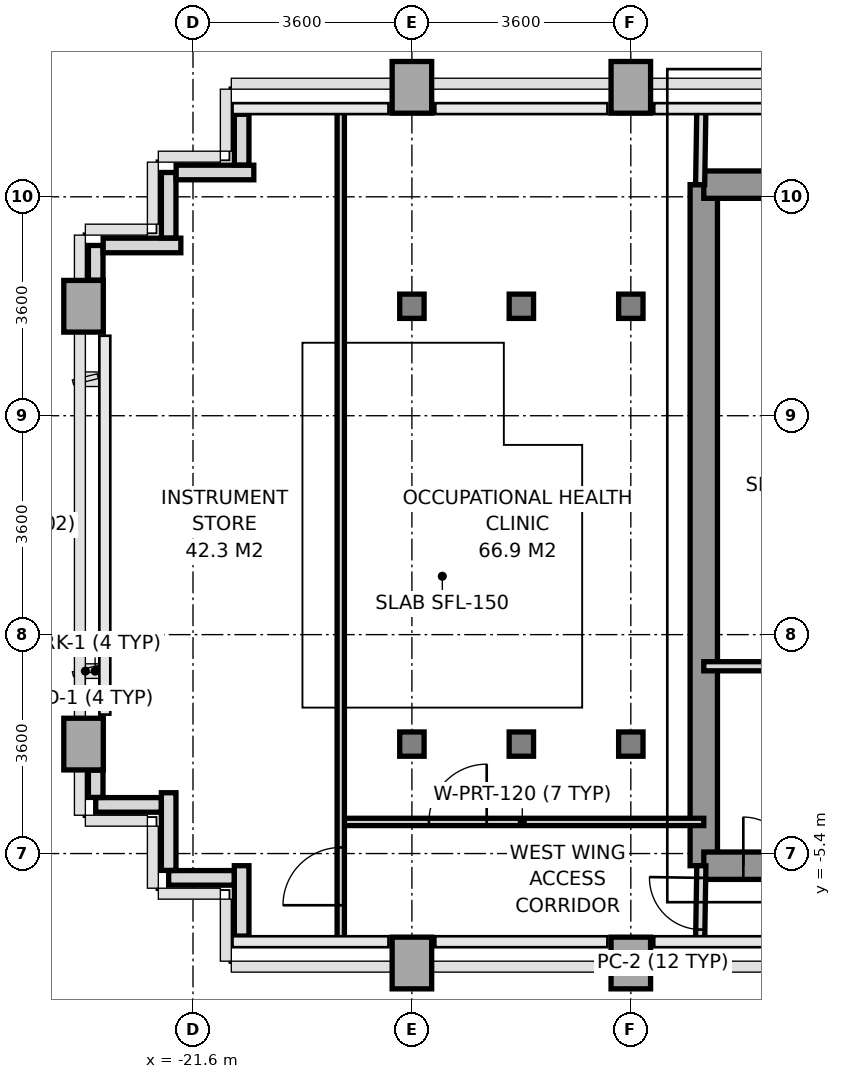
"""IFC4 building model, lengths in metres.
Left out: names, types, materials, properties, quantities, classifications, styles, units other than length and angle.
Written with IfcOpenShell. Run it as: python <this file> out.ifc"""

import sys

from ifc_helpers import new_model, si_unit, direction, frame, frame_2d, origin, origin_2d, place, context, subcontext, project, spatial, rectangle, i_section, extrude, source, transform, mapped, element, fill, save


model = new_model("IFC4")
c1 = context("Model", 3, precision=1e-05, world=origin(), true_north=direction((0.0, 1.0)))
c2 = subcontext(c1, "Body", "Model", "MODEL_VIEW")
j1 = project(units=[si_unit("LENGTHUNIT", "METRE"), si_unit("PLANEANGLEUNIT", "RADIAN")], contexts=[c1])
p1 = place(None, origin())
s1 = spatial("IfcSite", under=j1, at=p1, CompositionType="ELEMENT")
p2 = place(p1, origin())
s2 = spatial("IfcBuilding", under=s1, at=p2, CompositionType="ELEMENT")
p3 = place(p2, frame((0.0, 0.0, 141.4)))
s3 = spatial("IfcBuildingStorey", under=s2, at=p3, CompositionType="ELEMENT", Elevation=141.4)
m1 = source(origin(), c2, "Body", "SweptSolid", [
    extrude(rectangle(XDim=0.65, YDim=0.85, at=origin_2d()), origin(), (0.0, 0.0, 1.0), 3.2),
])
for number, where, z_axis, x_axis in (
    (1, (-23.4, -3.6, 0.0), (0.0, 0.0, 1.0), (1.0, 0.0, 0.0)),
    (2, (-23.4, 3.6, 0.0), (0.0, 0.0, 1.0), (1.0, 0.0, 0.0)),
    (3, (-18.0, -7.2, 0.0), (0.0, 0.0, 1.0), (1.0, 0.0, 0.0)),
):
    element("IfcColumn", number, at=place(p3, frame(where, z_axis=z_axis, x_axis=x_axis)), inside=s3, PredefinedType="COLUMN", context=c2, shape_type="MappedRepresentation", body=[
        mapped(m1, transform((0.0, 0.0, 0.0), x_axis=(1.0, 0.0, 0.0), y_axis=(0.0, 1.0, 0.0), z_axis=(0.0, 0.0, 1.0), scale=1.0)),
    ])
m2 = source(origin(), c2, "Body", "SweptSolid", [
    extrude(i_section(OverallWidth=0.401, OverallDepth=0.399, WebThickness=0.02, FlangeThickness=0.032, at=origin_2d()), origin(), (0.0, 0.0, 1.0), 3.2),
])
for number, where, z_axis, x_axis in (
    (4, (-18.0, -3.6, 0.0), (0.0, 0.0, 1.0), (1.0, 0.0, 0.0)),
    (5, (-18.0, 3.6, 0.0), (0.0, 0.0, 1.0), (1.0, 0.0, 0.0)),
):
    element("IfcColumn", number, at=place(p3, frame(where, z_axis=z_axis, x_axis=x_axis)), inside=s3, PredefinedType="COLUMN", context=c2, shape_type="MappedRepresentation", body=[
        mapped(m2, transform((0.0, 0.0, 0.0), x_axis=(1.0, 0.0, 0.0), y_axis=(0.0, 1.0, 0.0), z_axis=(0.0, 0.0, 1.0), scale=1.0)),
    ])
p4 = place(p3, frame((-18.0, 7.2, 0.0), z_axis=(0.0, 0.0, 1.0), x_axis=(1.0, 0.0, 0.0)))
e6 = element("IfcColumn", 6, at=p4, inside=s3, PredefinedType="COLUMN", context=c2, shape_type="MappedRepresentation", body=[
    mapped(m1, transform((0.0, 0.0, 0.0), x_axis=(1.0, 0.0, 0.0), y_axis=(0.0, 1.0, 0.0), z_axis=(0.0, 0.0, 1.0), scale=1.0)),
])
for number, where, z_axis, x_axis in (
    (7, (-16.2, -3.6, 0.0), (0.0, 0.0, 1.0), (1.0, 0.0, 0.0)),
    (8, (-16.2, 3.6, 0.0), (0.0, 0.0, 1.0), (1.0, 0.0, 0.0)),
):
    element("IfcColumn", number, at=place(p3, frame(where, z_axis=z_axis, x_axis=x_axis)), inside=s3, PredefinedType="COLUMN", context=c2, shape_type="MappedRepresentation", body=[
        mapped(m2, transform((0.0, 0.0, 0.0), x_axis=(1.0, 0.0, 0.0), y_axis=(0.0, 1.0, 0.0), z_axis=(0.0, 0.0, 1.0), scale=1.0)),
    ])
p5 = place(p3, frame((-14.4, -7.2, 0.0), z_axis=(0.0, 0.0, 1.0), x_axis=(1.0, 0.0, 0.0)))
e9 = element("IfcColumn", 9, at=p5, inside=s3, PredefinedType="COLUMN", context=c2, shape_type="MappedRepresentation", body=[
    mapped(m1, transform((0.0, 0.0, 0.0), x_axis=(1.0, 0.0, 0.0), y_axis=(0.0, 1.0, 0.0), z_axis=(0.0, 0.0, 1.0), scale=1.0)),
])
for number, where, z_axis, x_axis in (
    (10, (-14.4, -3.6, 0.0), (0.0, 0.0, 1.0), (1.0, 0.0, 0.0)),
    (11, (-14.4, 3.6, 0.0), (0.0, 0.0, 1.0), (1.0, 0.0, 0.0)),
):
    element("IfcColumn", number, at=place(p3, frame(where, z_axis=z_axis, x_axis=x_axis)), inside=s3, PredefinedType="COLUMN", context=c2, shape_type="MappedRepresentation", body=[
        mapped(m2, transform((0.0, 0.0, 0.0), x_axis=(1.0, 0.0, 0.0), y_axis=(0.0, 1.0, 0.0), z_axis=(0.0, 0.0, 1.0), scale=1.0)),
    ])
p6 = place(p3, frame((-14.4, 7.2, 0.0), z_axis=(0.0, 0.0, 1.0), x_axis=(1.0, 0.0, 0.0)))
e12 = element("IfcColumn", 12, at=p6, inside=s3, PredefinedType="COLUMN", context=c2, shape_type="MappedRepresentation", body=[
    mapped(m1, transform((0.0, 0.0, 0.0), x_axis=(1.0, 0.0, 0.0), y_axis=(0.0, 1.0, 0.0), z_axis=(0.0, 0.0, 1.0), scale=1.0)),
])
p7 = place(p3, frame((-20.8, -6.757, 0.0), z_axis=(0.0, 0.0, 1.0), x_axis=(0.0, 1.0, 0.0)))
e13 = element("IfcWall", 13, at=p7, inside=s3, PredefinedType="PARAPET", context=c2, shape_type="SweptSolid", body=[
    extrude(rectangle(XDim=1.157, YDim=0.24, at=frame_2d((0.579, 0.0))), origin(), (0.0, 0.0, 1.0), 1.15),
])
p8 = place(p3, frame((-20.923, -5.8, 0.0), z_axis=(0.0, 0.0, 1.0), x_axis=(-1.0, 0.0, 0.0)))
e14 = element("IfcWall", 14, at=p8, inside=s3, PredefinedType="PARAPET", context=c2, shape_type="SweptSolid", body=[
    extrude(rectangle(XDim=1.077, YDim=0.24, at=frame_2d((0.539, 0.0))), origin(), (0.0, 0.0, 1.0), 1.15),
])
p9 = place(p3, frame((-22.0, -5.677, 0.0), z_axis=(0.0, 0.0, 1.0), x_axis=(0.0, 1.0, 0.0)))
e15 = element("IfcWall", 15, at=p9, inside=s3, PredefinedType="PARAPET", context=c2, shape_type="SweptSolid", body=[
    extrude(rectangle(XDim=1.277, YDim=0.24, at=frame_2d((0.639, 0.0))), origin(), (0.0, 0.0, 1.0), 1.15),
])
p10 = place(p3, frame((-22.123, -4.6, 0.0), z_axis=(0.0, 0.0, 1.0), x_axis=(-1.0, 0.0, 0.0)))
e16 = element("IfcWall", 16, at=p10, inside=s3, PredefinedType="PARAPET", context=c2, shape_type="SweptSolid", body=[
    extrude(rectangle(XDim=1.077, YDim=0.24, at=frame_2d((0.539, 0.0))), origin(), (0.0, 0.0, 1.0), 1.15),
])
p11 = place(p3, frame((-23.2, -4.477, 0.0), z_axis=(0.0, 0.0, 1.0), x_axis=(0.0, 1.0, 0.0)))
e17 = element("IfcWall", 17, at=p11, inside=s3, PredefinedType="PARAPET", context=c2, shape_type="SweptSolid", body=[
    extrude(rectangle(XDim=0.449, YDim=0.24, at=frame_2d((0.225, 0.0))), origin(), (0.0, 0.0, 1.0), 1.15),
])
p12 = place(p3, frame((-23.2, 4.028, 0.0), z_axis=(0.0, 0.0, 1.0), x_axis=(0.0, 1.0, 0.0)))
e18 = element("IfcWall", 18, at=p12, inside=s3, PredefinedType="PARAPET", context=c2, shape_type="SweptSolid", body=[
    extrude(rectangle(XDim=0.572, YDim=0.24, at=frame_2d((0.286, 0.0))), origin(), (0.0, 0.0, 1.0), 1.15),
])
p13 = place(p3, frame((-23.077, 4.6, 0.0), z_axis=(0.0, 0.0, 1.0), x_axis=(1.0, 0.0, 0.0)))
e19 = element("IfcWall", 19, at=p13, inside=s3, PredefinedType="PARAPET", context=c2, shape_type="SweptSolid", body=[
    extrude(rectangle(XDim=1.277, YDim=0.24, at=frame_2d((0.638, 0.0))), origin(), (0.0, 0.0, 1.0), 1.15),
])
p14 = place(p3, frame((-22.0, 4.723, 0.0), z_axis=(0.0, 0.0, 1.0), x_axis=(0.0, 1.0, 0.0)))
e20 = element("IfcWall", 20, at=p14, inside=s3, PredefinedType="PARAPET", context=c2, shape_type="SweptSolid", body=[
    extrude(rectangle(XDim=1.077, YDim=0.24, at=frame_2d((0.539, 0.0))), origin(), (0.0, 0.0, 1.0), 1.15),
])
p15 = place(p3, frame((-21.877, 5.8, 0.0), z_axis=(0.0, 0.0, 1.0), x_axis=(1.0, 0.0, 0.0)))
e21 = element("IfcWall", 21, at=p15, inside=s3, PredefinedType="PARAPET", context=c2, shape_type="SweptSolid", body=[
    extrude(rectangle(XDim=1.277, YDim=0.24, at=frame_2d((0.638, 0.0))), origin(), (0.0, 0.0, 1.0), 1.15),
])
p16 = place(p3, frame((-20.8, 5.923, 0.0), z_axis=(0.0, 0.0, 1.0), x_axis=(0.0, 1.0, 0.0)))
e22 = element("IfcWall", 22, at=p16, inside=s3, PredefinedType="PARAPET", context=c2, shape_type="SweptSolid", body=[
    extrude(rectangle(XDim=0.834, YDim=0.24, at=frame_2d((0.417, 0.0))), origin(), (0.0, 0.0, 1.0), 1.15),
])
p17 = place(p3, frame((-13.2, -5.6, 0.0), z_axis=(0.0, 0.0, 1.0), x_axis=(0.0, 1.0, 0.0)))
e23 = element("IfcWall", 23, at=p17, inside=s3, PredefinedType="SHEAR", context=c2, shape_type="SweptSolid", body=[
    extrude(rectangle(XDim=11.2, YDim=0.45, at=frame_2d((5.6, 0.0))), origin(), (0.0, 0.0, 1.0), 3.2),
])
p18 = place(p3, frame((-13.2, 5.6, 0.0), z_axis=(0.0, 0.0, 1.0), x_axis=(1.0, 0.0, 0.0)))
e24 = element("IfcWall", 24, at=p18, inside=s3, PredefinedType="SHEAR", context=c2, shape_type="SweptSolid", body=[
    extrude(rectangle(XDim=1.819, YDim=0.45, at=frame_2d((0.909, 0.0))), origin(), (0.0, 0.0, 1.0), 3.2),
])
p19 = place(p3, frame((-13.2, -5.6, 0.0), z_axis=(0.0, 0.0, 1.0), x_axis=(1.0, 0.0, 0.0)))
e25 = element("IfcWall", 25, at=p19, inside=s3, PredefinedType="SHEAR", context=c2, shape_type="SweptSolid", body=[
    extrude(rectangle(XDim=7.8, YDim=0.45, at=frame_2d((3.9, 0.0))), origin(), (0.0, 0.0, 1.0), 3.2),
])
p20 = place(p19, frame((3.6, 0.0, 0.0)))
e26 = element("IfcOpeningElement", 26, at=p20, cuts=e25, PredefinedType="OPENING", context=c2, shape_type="SweptSolid", body=[
    extrude(rectangle(XDim=1.2, YDim=2.2, at=frame_2d((0.6, 1.1))), frame((0.0, 0.235, 0.0), z_axis=(0.0, -1.0, 0.0), x_axis=(1.0, 0.0, 0.0)), (0.0, 0.0, 1.0), 0.47),
])
p21 = place(p19, frame((0.65, 0.0, 0.0)))
e27 = element("IfcOpeningElement", 27, at=p21, cuts=e25, PredefinedType="OPENING", context=c2, shape_type="SweptSolid", body=[
    extrude(rectangle(XDim=0.8, YDim=2.1, at=frame_2d((0.4, 1.05))), frame((0.0, 0.235, 0.0), z_axis=(0.0, -1.0, 0.0), x_axis=(1.0, 0.0, 0.0)), (0.0, 0.0, 1.0), 0.47),
])
p22 = place(p3, frame((-13.2, -2.32, 0.0), z_axis=(0.0, 0.0, 1.0), x_axis=(1.0, 0.0, 0.0)))
e28 = element("IfcWall", 28, at=p22, inside=s3, PredefinedType="PARTITIONING", context=c2, shape_type="SweptSolid", body=[
    extrude(rectangle(XDim=2.18, YDim=0.15, at=frame_2d((1.09, 0.0))), origin(), (0.0, 0.0, 1.0), 3.2),
])
p23 = place(p3, frame((-13.26, 5.6, 0.0), z_axis=(0.0, 0.0, 1.0), x_axis=(0.016013571389, 0.999871774545, 0.0)))
e29 = element("IfcWall", 29, at=p23, inside=s3, PredefinedType="PARTITIONING", context=c2, shape_type="SweptSolid", body=[
    extrude(rectangle(XDim=1.25, YDim=0.15, at=frame_2d((0.625, 0.0))), origin(), (0.0, 0.0, 1.0), 3.2),
])
p24 = place(p3, frame((-13.26, -6.85, 0.0), z_axis=(0.0, 0.0, 1.0), x_axis=(0.016013571389, 0.999871774545, 0.0)))
e30 = element("IfcWall", 30, at=p24, inside=s3, PredefinedType="PARTITIONING", context=c2, shape_type="SweptSolid", body=[
    extrude(rectangle(XDim=1.25, YDim=0.15, at=frame_2d((0.625, 0.0))), origin(), (0.0, 0.0, 1.0), 3.2),
])
p25 = place(p24, frame((0.2, 0.0, 0.0)))
e31 = element("IfcOpeningElement", 31, at=p25, cuts=e30, PredefinedType="OPENING", context=c2, shape_type="SweptSolid", body=[
    extrude(rectangle(XDim=0.85, YDim=2.1, at=frame_2d((0.425, 1.05))), frame((0.0, 0.085, 0.0), z_axis=(0.0, -1.0, 0.0), x_axis=(1.0, 0.0, 0.0)), (0.0, 0.0, 1.0), 0.17),
])
p26 = place(p3, frame((-19.17, -4.88, 0.0), z_axis=(0.0, 0.0, 1.0), x_axis=(1.0, 0.0, 0.0)))
e32 = element("IfcWall", 32, at=p26, inside=s3, PredefinedType="PARTITIONING", context=c2, shape_type="SweptSolid", body=[
    extrude(rectangle(XDim=5.97, YDim=0.12, at=frame_2d((2.985, 0.0))), origin(), (0.0, 0.0, 1.0), 2.75),
])
p27 = place(p26, frame((1.45, 0.0, 0.0)))
e33 = element("IfcOpeningElement", 33, at=p27, cuts=e32, PredefinedType="OPENING", context=c2, shape_type="SweptSolid", body=[
    extrude(rectangle(XDim=0.95, YDim=2.15, at=frame_2d((0.475, 1.075))), frame((0.0, 0.07, 0.0), z_axis=(0.0, -1.0, 0.0), x_axis=(1.0, 0.0, 0.0)), (0.0, 0.0, 1.0), 0.14),
])
p28 = place(p3, frame((-19.17, -6.85, 0.0), z_axis=(0.0, 0.0, 1.0), x_axis=(0.0, 1.0, 0.0)))
e34 = element("IfcWall", 34, at=p28, inside=s3, PredefinedType="PARTITIONING", context=c2, shape_type="SweptSolid", body=[
    extrude(rectangle(XDim=13.7, YDim=0.12, at=frame_2d((6.85, 0.0))), origin(), (0.0, 0.0, 1.0), 2.7),
])
p29 = place(p28, frame((0.6, 0.0, 0.0)))
e35 = element("IfcOpeningElement", 35, at=p29, cuts=e34, PredefinedType="OPENING", context=c2, shape_type="SweptSolid", body=[
    extrude(rectangle(XDim=0.95, YDim=2.15, at=frame_2d((0.475, 1.075))), frame((0.0, 0.07, 0.0), z_axis=(0.0, -1.0, 0.0), x_axis=(1.0, 0.0, 0.0)), (0.0, 0.0, 1.0), 0.14),
])
m3 = source(origin(), c2, "Body", "SweptSolid", [
    extrude(rectangle(XDim=0.8, YDim=2.1, at=frame_2d((0.4, 1.05))), frame((0.0, 0.025, 0.0), z_axis=(0.0, -1.0, 0.0), x_axis=(1.0, 0.0, 0.0)), (0.0, 0.0, 1.0), 0.05),
])
p30 = place(p21, origin())
e36 = element("IfcDoor", 36, at=p30, inside=s3, OperationType="SINGLE_SWING_LEFT", PredefinedType="DOOR", context=c2, shape_type="MappedRepresentation", body=[
    mapped(m3, transform((0.0, 0.0, 0.0), x_axis=(1.0, 0.0, 0.0), y_axis=(0.0, 1.0, 0.0), z_axis=(0.0, 0.0, 1.0), scale=1.0)),
])
fill(e27, e36)
m4 = source(origin(), c2, "Body", "SweptSolid", [
    extrude(rectangle(XDim=0.95, YDim=2.15, at=frame_2d((0.475, 1.075))), frame((0.0, 0.025, 0.0), z_axis=(0.0, -1.0, 0.0), x_axis=(1.0, 0.0, 0.0)), (0.0, 0.0, 1.0), 0.05),
])
p31 = place(p27, origin())
e37 = element("IfcDoor", 37, at=p31, inside=s3, OperationType="SINGLE_SWING_RIGHT", PredefinedType="DOOR", context=c2, shape_type="MappedRepresentation", body=[
    mapped(m4, transform((0.0, 0.0, 0.0), x_axis=(1.0, 0.0, 0.0), y_axis=(0.0, 1.0, 0.0), z_axis=(0.0, 0.0, 1.0), scale=1.0)),
])
fill(e33, e37)
p32 = place(p29, origin())
e38 = element("IfcDoor", 38, at=p32, inside=s3, OperationType="SINGLE_SWING_LEFT", PredefinedType="DOOR", context=c2, shape_type="MappedRepresentation", body=[
    mapped(m4, transform((0.0, 0.0, 0.0), x_axis=(1.0, 0.0, 0.0), y_axis=(0.0, 1.0, 0.0), z_axis=(0.0, 0.0, 1.0), scale=1.0)),
])
fill(e35, e38)
m5 = source(origin(), c2, "Body", "SweptSolid", [
    extrude(rectangle(XDim=0.85, YDim=2.1, at=frame_2d((0.425, 1.05))), frame((0.0, 0.025, 0.0), z_axis=(0.0, -1.0, 0.0), x_axis=(1.0, 0.0, 0.0)), (0.0, 0.0, 1.0), 0.05),
])
p33 = place(p25, origin())
e39 = element("IfcDoor", 39, at=p33, inside=s3, OperationType="SINGLE_SWING_RIGHT", PredefinedType="DOOR", context=c2, shape_type="MappedRepresentation", body=[
    mapped(m5, transform((0.0, 0.0, 0.0), x_axis=(1.0, 0.0, 0.0), y_axis=(0.0, 1.0, 0.0), z_axis=(0.0, 0.0, 1.0), scale=1.0)),
])
fill(e31, e39)
save(model, sys.argv[1])
